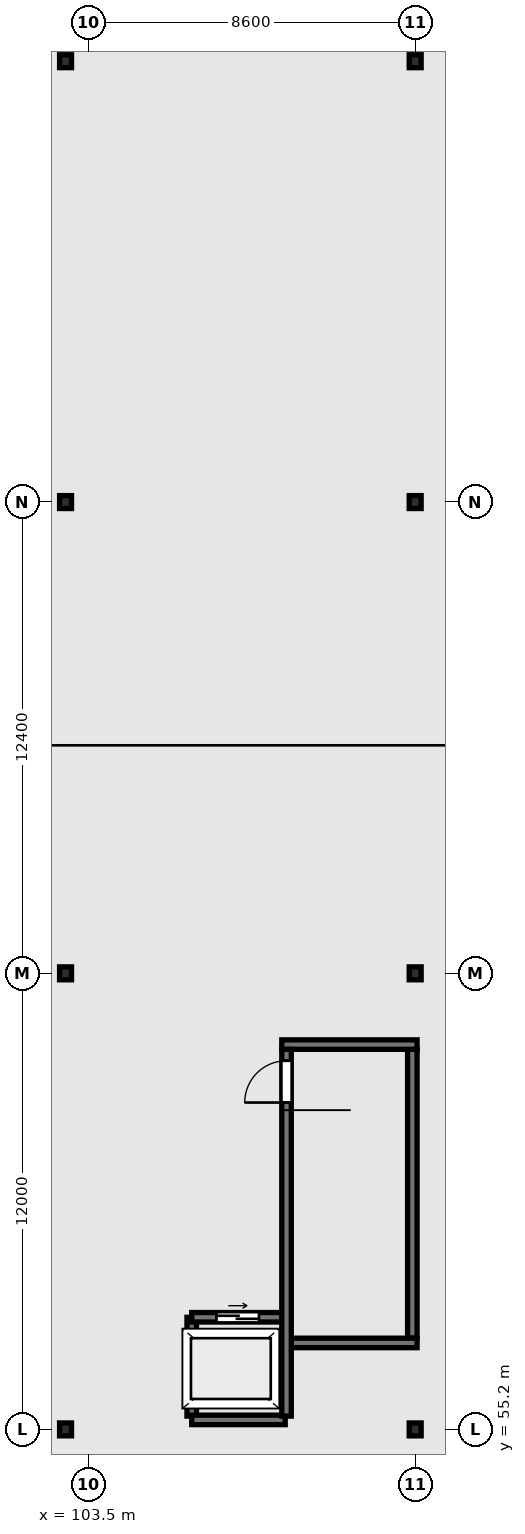
"""IFC4 building model, lengths in metres.
Left out: names, types, materials, properties, quantities, classifications, styles, units other than length and angle.
Written with IfcOpenShell. Run it as: python <this file> out.ifc"""

import sys

from ifc_helpers import new_model, si_unit, direction, frame, frame_2d, origin, origin_2d, place, context, subcontext, project, spatial, rectangle, i_section, extrude, element, fill, save


model = new_model("IFC4")
c1 = context("Model", 3, precision=1e-05, world=origin(), true_north=direction((0.0, 1.0)))
c2 = subcontext(c1, "Body", "Model", "MODEL_VIEW")
j1 = project(units=[si_unit("LENGTHUNIT", "METRE"), si_unit("PLANEANGLEUNIT", "RADIAN")], contexts=[c1])
p1 = place(None, origin())
s1 = spatial("IfcSite", under=j1, at=p1, CompositionType="ELEMENT")
p2 = place(p1, origin())
s2 = spatial("IfcBuilding", under=s1, at=p2, CompositionType="ELEMENT")
p3 = place(p2, frame((0.0, 0.0, 264.2)))
s3 = spatial("IfcBuildingStorey", under=s2, at=p3, CompositionType="ELEMENT", Elevation=264.2)
for number, where, z_axis, x_axis in (
    (1, (102.9, 55.2, 0.0), (0.0, 0.0, 1.0), (1.0, 0.0, 0.0)),
    (2, (102.9, 67.2, 0.0), (0.0, 0.0, 1.0), (1.0, 0.0, 0.0)),
    (3, (102.9, 79.6, 0.0), (0.0, 0.0, 1.0), (1.0, 0.0, 0.0)),
    (4, (102.9, 91.2, 0.0), (0.0, 0.0, 1.0), (1.0, 0.0, 0.0)),
):
    element("IfcColumn", number, at=place(p3, frame(where, z_axis=z_axis, x_axis=x_axis)), inside=s3, PredefinedType="COLUMN", context=c2, shape_type="SweptSolid", body=[
        extrude(i_section(OverallWidth=0.314, OverallDepth=0.34, WebThickness=0.019, FlangeThickness=0.031, FilletRadius=0.015, at=origin_2d()), origin(), (0.0, 0.0, 1.0), 16.869),
    ])
for number, where, z_axis, x_axis in (
    (5, (112.1, 55.2, 0.0), (0.0, 0.0, 1.0), (1.0, 0.0, 0.0)),
    (6, (112.1, 67.2, 0.0), (0.0, 0.0, 1.0), (1.0, 0.0, 0.0)),
    (7, (112.1, 79.6, 0.0), (0.0, 0.0, 1.0), (1.0, 0.0, 0.0)),
    (8, (112.1, 91.2, 0.0), (0.0, 0.0, 1.0), (1.0, 0.0, 0.0)),
):
    element("IfcColumn", number, at=place(p3, frame(where, z_axis=z_axis, x_axis=x_axis)), inside=s3, PredefinedType="COLUMN", context=c2, shape_type="SweptSolid", body=[
        extrude(i_section(OverallWidth=0.314, OverallDepth=0.34, WebThickness=0.019, FlangeThickness=0.031, FilletRadius=0.015, at=origin_2d()), origin(), (0.0, 0.0, 1.0), 17.211),
    ])
p4 = place(p3, frame((106.22, 55.55, 0.0), z_axis=(0.0, 0.0, 1.0), x_axis=(0.0, 1.0, 0.0)))
e9 = element("IfcWall", 9, at=p4, inside=s3, PredefinedType="SHEAR", context=c2, shape_type="SweptSolid", body=[
    extrude(rectangle(XDim=2.6, YDim=0.25, at=frame_2d((1.3, 0.0))), origin(), (0.0, 0.0, 1.0), 16.992),
])
p5 = place(p3, frame((106.22, 55.45, 0.0), z_axis=(0.0, 0.0, 1.0), x_axis=(1.0, 0.0, 0.0)))
e10 = element("IfcWall", 10, at=p5, inside=s3, PredefinedType="SHEAR", context=c2, shape_type="SweptSolid", body=[
    extrude(rectangle(XDim=2.46, YDim=0.25, at=frame_2d((1.23, 0.0))), origin(), (0.0, 0.0, 1.0), 16.992),
])
p6 = place(p3, frame((106.22, 58.15, 0.0), z_axis=(0.0, 0.0, 1.0), x_axis=(1.0, 0.0, 0.0)))
e11 = element("IfcWall", 11, at=p6, inside=s3, PredefinedType="SHEAR", context=c2, shape_type="SweptSolid", body=[
    extrude(rectangle(XDim=2.46, YDim=0.25, at=frame_2d((1.23, 0.0))), origin(), (0.0, 0.0, 1.0), 16.992),
])
p7 = place(p6, frame((0.65, 0.0, 0.0)))
e12 = element("IfcOpeningElement", 12, at=p7, cuts=e11, PredefinedType="OPENING", context=c2, shape_type="SweptSolid", body=[
    extrude(rectangle(XDim=1.12, YDim=2.12, at=frame_2d((0.56, 1.06))), frame((0.0, 0.135, 0.0), z_axis=(0.0, -1.0, 0.0), x_axis=(1.0, 0.0, 0.0)), (0.0, 0.0, 1.0), 0.27),
])
p8 = place(p3, frame((112.025, 57.6, 0.0), z_axis=(0.0, 0.0, 1.0), x_axis=(0.0, 1.0, 0.0)))
e13 = element("IfcWall", 13, at=p8, inside=s3, PredefinedType="SHEAR", context=c2, shape_type="SweptSolid", body=[
    extrude(rectangle(XDim=7.6, YDim=0.25, at=frame_2d((3.8, 0.0))), origin(), (0.0, 0.0, 1.0), 17.208),
])
for number, where, z_axis, x_axis in (
    (14, (108.59, 57.475, 0.0), (0.0, 0.0, 1.0), (1.0, 0.0, 0.0)),
    (15, (108.59, 65.325, 0.0), (0.0, 0.0, 1.0), (1.0, 0.0, 0.0)),
):
    element("IfcWall", number, at=place(p3, frame(where, z_axis=z_axis, x_axis=x_axis)), inside=s3, PredefinedType="SHEAR", context=c2, shape_type="SweptSolid", body=[
        extrude(rectangle(XDim=3.56, YDim=0.25, at=frame_2d((1.78, 0.0))), origin(), (0.0, 0.0, 1.0), 17.08),
    ])
p9 = place(p3, frame((108.715, 55.55, 0.0), z_axis=(0.0, 0.0, 1.0), x_axis=(0.0, 1.0, 0.0)))
e16 = element("IfcWall", 16, at=p9, inside=s3, PredefinedType="SHEAR", context=c2, shape_type="SweptSolid", body=[
    extrude(rectangle(XDim=9.65, YDim=0.25, at=frame_2d((4.825, 0.0))), origin(), (0.0, 0.0, 1.0), 17.085),
])
p10 = place(p9, frame((8.25, 0.0, 0.0)))
e17 = element("IfcOpeningElement", 17, at=p10, cuts=e16, PredefinedType="OPENING", context=c2, shape_type="SweptSolid", body=[
    extrude(rectangle(XDim=1.1, YDim=2.1, at=frame_2d((0.55, 1.05))), frame((0.0, 0.135, 0.0), z_axis=(0.0, -1.0, 0.0), x_axis=(1.0, 0.0, 0.0)), (0.0, 0.0, 1.0), 0.27),
])
p11 = place(p7, origin())
e18 = element("IfcDoor", 18, at=p11, inside=s3, OperationType="SLIDING_TO_RIGHT", PredefinedType="DOOR", context=c2, shape_type="SweptSolid", body=[
    extrude(rectangle(XDim=1.12, YDim=2.12, at=frame_2d((0.56, 1.06))), frame((0.0, 0.025, 0.0), z_axis=(0.0, -1.0, 0.0), x_axis=(1.0, 0.0, 0.0)), (0.0, 0.0, 1.0), 0.05),
])
fill(e12, e18)
p12 = place(p10, origin())
e19 = element("IfcDoor", 19, at=p12, inside=s3, OperationType="SINGLE_SWING_LEFT", PredefinedType="DOOR", context=c2, shape_type="SweptSolid", body=[
    extrude(rectangle(XDim=1.1, YDim=2.1, at=frame_2d((0.55, 1.05))), frame((0.0, 0.025, 0.0), z_axis=(0.0, -1.0, 0.0), x_axis=(1.0, 0.0, 0.0)), (0.0, 0.0, 1.0), 0.05),
])
fill(e17, e19)
save(model, sys.argv[1])
